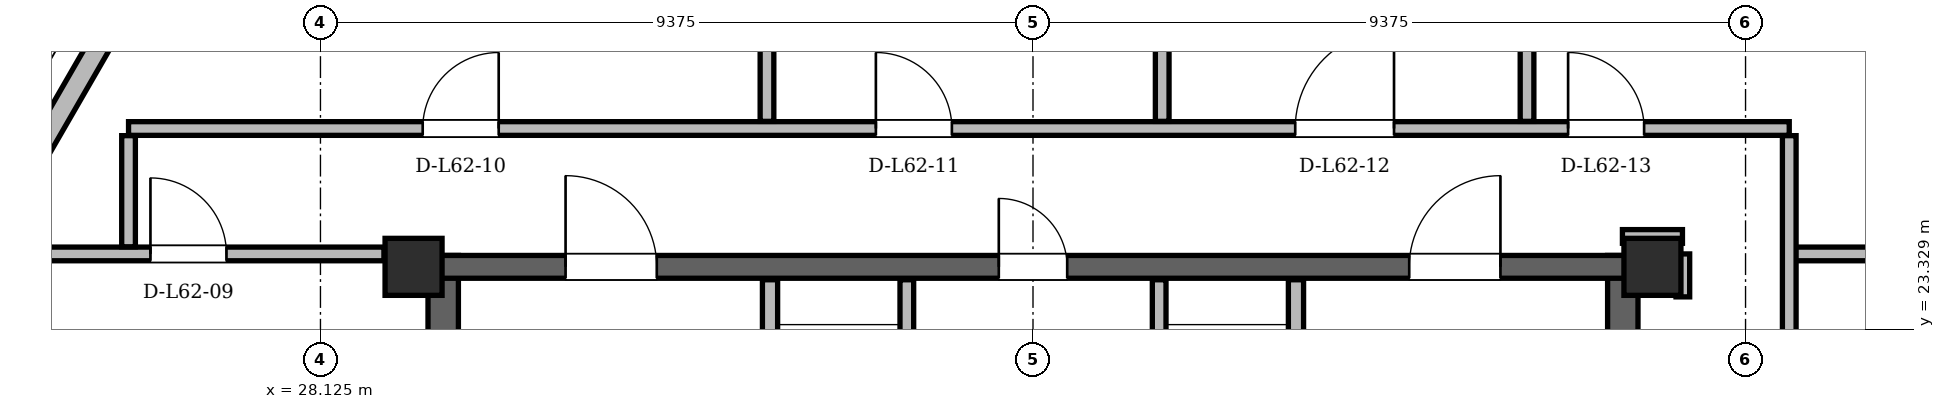
"""IFC4 building model, lengths in metres.
Left out: names, types, materials, properties, quantities, classifications, styles, units other than length and angle.
Written with IfcOpenShell. Run it as: python <this file> out.ifc"""

import sys

from ifc_helpers import new_model, si_unit, direction, frame, frame_2d, origin, origin_2d, place, context, subcontext, project, spatial, rectangle, hollow_rectangle, extrude, element, fill, save


model = new_model("IFC4")
c1 = context("Model", 3, precision=1e-05, world=origin(), true_north=direction((0.0, 1.0)))
c2 = subcontext(c1, "Body", "Model", "MODEL_VIEW")
j1 = project(units=[si_unit("LENGTHUNIT", "METRE"), si_unit("PLANEANGLEUNIT", "RADIAN")], contexts=[c1])
p1 = place(None, origin())
s1 = spatial("IfcSite", under=j1, at=p1, CompositionType="ELEMENT")
p2 = place(p1, origin())
s2 = spatial("IfcBuilding", under=s1, at=p2, CompositionType="ELEMENT")
p3 = place(p2, frame((0.0, 0.0, 234.3)))
s3 = spatial("IfcBuildingStorey", under=s2, at=p3, CompositionType="ELEMENT", Elevation=234.3)
for number, where, z_axis, x_axis in (
    (1, (45.65, 24.15, 0.0), (0.0, 0.0, 1.0), (1.0, 0.0, 0.0)),
    (2, (29.35, 24.15, 0.0), (0.0, 0.0, 1.0), (1.0, 0.0, 0.0)),
):
    element("IfcColumn", number, at=place(p3, frame(where, z_axis=z_axis, x_axis=x_axis)), inside=s3, PredefinedType="COLUMN", context=c2, shape_type="SweptSolid", body=[
        extrude(hollow_rectangle(XDim=0.75, YDim=0.75, WallThickness=0.06, at=origin_2d()), origin(), (0.0, 0.0, 1.0), 3.6),
    ])
for number, where, z_axis, x_axis in (
    (3, (29.74, 11.0, 0.0), (0.0, 0.0, 1.0), (0.0, 1.0, 0.0)),
    (4, (45.26, 11.0, 0.0), (0.0, 0.0, 1.0), (0.0, 1.0, 0.0)),
):
    element("IfcWall", number, at=place(p3, frame(where, z_axis=z_axis, x_axis=x_axis)), inside=s3, PredefinedType="SHEAR", context=c2, shape_type="SweptSolid", body=[
        extrude(rectangle(XDim=13.3, YDim=0.4, at=frame_2d((6.65, 0.0))), origin(), (0.0, 0.0, 1.0), 3.38),
    ])
p4 = place(p3, frame((29.65, 24.15, 0.0), z_axis=(0.0, 0.0, 1.0), x_axis=(1.0, 0.0, 0.0)))
e5 = element("IfcWall", 5, at=p4, inside=s3, PredefinedType="SHEAR", context=c2, shape_type="SweptSolid", body=[
    extrude(rectangle(XDim=15.7, YDim=0.3, at=frame_2d((7.85, 0.0))), origin(), (0.0, 0.0, 1.0), 3.38),
])
p5 = place(p4, frame((1.7, 0.0, 0.0)))
e6 = element("IfcOpeningElement", 6, at=p5, cuts=e5, PredefinedType="OPENING", context=c2, shape_type="SweptSolid", body=[
    extrude(rectangle(XDim=1.2, YDim=2.2, at=frame_2d((0.6, 1.1))), frame((0.0, 0.15, 0.0), z_axis=(0.0, -1.0, 0.0), x_axis=(1.0, 0.0, 0.0)), (0.0, 0.0, 1.0), 0.3),
])
p6 = place(p4, frame((12.8, 0.0, 0.0)))
e7 = element("IfcOpeningElement", 7, at=p6, cuts=e5, PredefinedType="OPENING", context=c2, shape_type="SweptSolid", body=[
    extrude(rectangle(XDim=1.2, YDim=2.2, at=frame_2d((0.6, 1.1))), frame((0.0, 0.15, 0.0), z_axis=(0.0, -1.0, 0.0), x_axis=(1.0, 0.0, 0.0)), (0.0, 0.0, 1.0), 0.3),
])
p7 = place(p4, frame((7.4, 0.0, 0.0)))
e8 = element("IfcOpeningElement", 8, at=p7, cuts=e5, PredefinedType="OPENING", context=c2, shape_type="SweptSolid", body=[
    extrude(rectangle(XDim=0.9, YDim=2.05, at=frame_2d((0.45, 1.025))), frame((0.0, 0.15, 0.0), z_axis=(0.0, -1.0, 0.0), x_axis=(1.0, 0.0, 0.0)), (0.0, 0.0, 1.0), 0.3),
])
p8 = place(p3, frame((58.942, 11.205, 0.0), z_axis=(0.0, 0.0, 1.0), x_axis=(-0.500000614513, 0.866025048995, 0.0)))
e9 = element("IfcWall", 9, at=p8, inside=s3, PredefinedType="SOLIDWALL", context=c2, shape_type="SweptSolid", body=[
    extrude(rectangle(XDim=36.848, YDim=0.29, at=frame_2d((18.424, 0.0))), origin(), (0.0, 0.0, 1.0), 2.677),
])
p9 = place(p8, frame((7.615, 0.0, 0.0)))
e10 = element("IfcOpeningElement", 10, at=p9, cuts=e9, PredefinedType="OPENING", context=c2, shape_type="SweptSolid", body=[
    extrude(rectangle(XDim=1.5, YDim=2.2, at=frame_2d((0.75, 1.1))), frame((0.0, 0.145, 0.0), z_axis=(0.0, -1.0, 0.0), x_axis=(1.0, 0.0, 0.0)), (0.0, 0.0, 1.0), 0.29),
])
p10 = place(p8, frame((28.658, 0.0, 0.0)))
e11 = element("IfcOpeningElement", 11, at=p10, cuts=e9, PredefinedType="OPENING", context=c2, shape_type="SweptSolid", body=[
    extrude(rectangle(XDim=1.3, YDim=2.2, at=frame_2d((0.65, 1.1))), frame((0.0, 0.145, 0.0), z_axis=(0.0, -1.0, 0.0), x_axis=(1.0, 0.0, 0.0)), (0.0, 0.0, 1.0), 0.29),
])
p11 = place(p8, frame((3.643, 0.0, 0.85)))
e12 = element("IfcOpeningElement", 12, at=p11, cuts=e9, PredefinedType="OPENING", context=c2, shape_type="SweptSolid", body=[
    extrude(rectangle(XDim=1.2, YDim=1.48, at=frame_2d((0.6, 0.74))), frame((0.0, 0.145, 0.0), z_axis=(0.0, -1.0, 0.0), x_axis=(1.0, 0.0, 0.0)), (0.0, 0.0, 1.0), 0.29),
])
p12 = place(p8, frame((1.09, 0.0, 0.85)))
e13 = element("IfcOpeningElement", 13, at=p12, cuts=e9, PredefinedType="OPENING", context=c2, shape_type="SweptSolid", body=[
    extrude(rectangle(XDim=1.6, YDim=1.7, at=frame_2d((0.8, 0.85))), frame((0.0, 0.145, 0.0), z_axis=(0.0, -1.0, 0.0), x_axis=(1.0, 0.0, 0.0)), (0.0, 0.0, 1.0), 0.29),
])
p13 = place(p8, frame((34.714, 0.0, 0.85)))
e14 = element("IfcOpeningElement", 14, at=p13, cuts=e9, PredefinedType="OPENING", context=c2, shape_type="SweptSolid", body=[
    extrude(rectangle(XDim=1.2, YDim=1.48, at=frame_2d((0.6, 0.74))), frame((0.0, 0.145, 0.0), z_axis=(0.0, -1.0, 0.0), x_axis=(1.0, 0.0, 0.0)), (0.0, 0.0, 1.0), 0.29),
])
p14 = place(p8, frame((31.648, 0.0, 0.85)))
e15 = element("IfcOpeningElement", 15, at=p14, cuts=e9, PredefinedType="OPENING", context=c2, shape_type="SweptSolid", body=[
    extrude(rectangle(XDim=1.2, YDim=1.48, at=frame_2d((0.6, 0.74))), frame((0.0, 0.145, 0.0), z_axis=(0.0, -1.0, 0.0), x_axis=(1.0, 0.0, 0.0)), (0.0, 0.0, 1.0), 0.29),
])
p15 = place(p8, frame((16.738, 0.0, 0.85)))
e16 = element("IfcOpeningElement", 16, at=p15, cuts=e9, PredefinedType="OPENING", context=c2, shape_type="SweptSolid", body=[
    extrude(rectangle(XDim=2.2, YDim=1.717, at=frame_2d((1.1, 0.858))), frame((0.0, 0.145, 0.0), z_axis=(0.0, -1.0, 0.0), x_axis=(1.0, 0.0, 0.0)), (0.0, 0.0, 1.0), 0.29),
])
p16 = place(p8, frame((22.794, 0.0, 0.85)))
e17 = element("IfcOpeningElement", 17, at=p16, cuts=e9, PredefinedType="OPENING", context=c2, shape_type="SweptSolid", body=[
    extrude(rectangle(XDim=1.6, YDim=1.7, at=frame_2d((0.8, 0.85))), frame((0.0, 0.145, 0.0), z_axis=(0.0, -1.0, 0.0), x_axis=(1.0, 0.0, 0.0)), (0.0, 0.0, 1.0), 0.29),
])
p17 = place(p8, frame((12.349, 0.0, 0.85)))
e18 = element("IfcOpeningElement", 18, at=p17, cuts=e9, PredefinedType="OPENING", context=c2, shape_type="SweptSolid", body=[
    extrude(rectangle(XDim=1.2, YDim=1.48, at=frame_2d((0.6, 0.74))), frame((0.0, 0.145, 0.0), z_axis=(0.0, -1.0, 0.0), x_axis=(1.0, 0.0, 0.0)), (0.0, 0.0, 1.0), 0.29),
])
p18 = place(p3, frame((34.482, 43.116, 0.0), z_axis=(0.0, 0.0, 1.0), x_axis=(-0.500000614513, -0.866025048995, 0.0)))
e19 = element("IfcWall", 19, at=p18, inside=s3, PredefinedType="SOLIDWALL", context=c2, shape_type="SweptSolid", body=[
    extrude(rectangle(XDim=36.848, YDim=0.29, at=frame_2d((18.424, 0.0))), origin(), (0.0, 0.0, 1.0), 2.677),
])
p19 = place(p18, frame((8.034, 0.0, 0.0)))
e20 = element("IfcOpeningElement", 20, at=p19, cuts=e19, PredefinedType="OPENING", context=c2, shape_type="SweptSolid", body=[
    extrude(rectangle(XDim=1.5, YDim=2.2, at=frame_2d((0.75, 1.1))), frame((0.0, 0.145, 0.0), z_axis=(0.0, -1.0, 0.0), x_axis=(1.0, 0.0, 0.0)), (0.0, 0.0, 1.0), 0.29),
])
p20 = place(p18, frame((28.559, 0.0, 0.0)))
e21 = element("IfcOpeningElement", 21, at=p20, cuts=e19, PredefinedType="OPENING", context=c2, shape_type="SweptSolid", body=[
    extrude(rectangle(XDim=1.5, YDim=2.2, at=frame_2d((0.75, 1.1))), frame((0.0, 0.145, 0.0), z_axis=(0.0, -1.0, 0.0), x_axis=(1.0, 0.0, 0.0)), (0.0, 0.0, 1.0), 0.29),
])
p21 = place(p18, frame((21.863, 0.0, 0.85)))
e22 = element("IfcOpeningElement", 22, at=p21, cuts=e19, PredefinedType="OPENING", context=c2, shape_type="SweptSolid", body=[
    extrude(rectangle(XDim=2.4, YDim=1.717, at=frame_2d((1.2, 0.858))), frame((0.0, 0.145, 0.0), z_axis=(0.0, -1.0, 0.0), x_axis=(1.0, 0.0, 0.0)), (0.0, 0.0, 1.0), 0.29),
])
p22 = place(p18, frame((34.677, 0.0, 0.85)))
e23 = element("IfcOpeningElement", 23, at=p22, cuts=e19, PredefinedType="OPENING", context=c2, shape_type="SweptSolid", body=[
    extrude(rectangle(XDim=1.2, YDim=1.48, at=frame_2d((0.6, 0.74))), frame((0.0, 0.145, 0.0), z_axis=(0.0, -1.0, 0.0), x_axis=(1.0, 0.0, 0.0)), (0.0, 0.0, 1.0), 0.29),
])
p23 = place(p18, frame((32.477, 0.0, 0.85)))
e24 = element("IfcOpeningElement", 24, at=p23, cuts=e19, PredefinedType="OPENING", context=c2, shape_type="SweptSolid", body=[
    extrude(rectangle(XDim=1.4, YDim=1.6, at=frame_2d((0.7, 0.8))), frame((0.0, 0.145, 0.0), z_axis=(0.0, -1.0, 0.0), x_axis=(1.0, 0.0, 0.0)), (0.0, 0.0, 1.0), 0.29),
])
p24 = place(p18, frame((12.14, 0.0, 0.85)))
e25 = element("IfcOpeningElement", 25, at=p24, cuts=e19, PredefinedType="OPENING", context=c2, shape_type="SweptSolid", body=[
    extrude(rectangle(XDim=1.2, YDim=1.48, at=frame_2d((0.6, 0.74))), frame((0.0, 0.145, 0.0), z_axis=(0.0, -1.0, 0.0), x_axis=(1.0, 0.0, 0.0)), (0.0, 0.0, 1.0), 0.29),
])
p25 = place(p18, frame((16.54, 0.0, 0.85)))
e26 = element("IfcOpeningElement", 26, at=p25, cuts=e19, PredefinedType="OPENING", context=c2, shape_type="SweptSolid", body=[
    extrude(rectangle(XDim=2.0, YDim=1.717, at=frame_2d((1.0, 0.858))), frame((0.0, 0.145, 0.0), z_axis=(0.0, -1.0, 0.0), x_axis=(1.0, 0.0, 0.0)), (0.0, 0.0, 1.0), 0.29),
])
p26 = place(p18, frame((2.059, 0.0, 0.85)))
e27 = element("IfcOpeningElement", 27, at=p26, cuts=e19, PredefinedType="OPENING", context=c2, shape_type="SweptSolid", body=[
    extrude(rectangle(XDim=1.2, YDim=1.48, at=frame_2d((0.6, 0.74))), frame((0.0, 0.145, 0.0), z_axis=(0.0, -1.0, 0.0), x_axis=(1.0, 0.0, 0.0)), (0.0, 0.0, 1.0), 0.29),
])
p27 = place(p3, frame((34.04, 19.48, 0.0), z_axis=(0.0, 0.0, 1.0), x_axis=(0.0, 1.0, 0.0)))
e28 = element("IfcWall", 28, at=p27, inside=s3, PredefinedType="PARTITIONING", context=c2, shape_type="SweptSolid", body=[
    extrude(rectangle(XDim=4.5, YDim=0.2, at=frame_2d((2.25, 0.0))), origin(), (0.0, 0.0, 1.0), 3.38),
])
p28 = place(p27, frame((2.12, 0.0, 0.0)))
e29 = element("IfcOpeningElement", 29, at=p28, cuts=e28, PredefinedType="OPENING", context=c2, shape_type="SweptSolid", body=[
    extrude(rectangle(XDim=1.1, YDim=2.2, at=frame_2d((0.55, 1.1))), frame((0.0, 0.1, 0.0), z_axis=(0.0, -1.0, 0.0), x_axis=(1.0, 0.0, 0.0)), (0.0, 0.0, 1.0), 0.2),
])
p29 = place(p3, frame((35.84, 20.96, 0.0), z_axis=(0.0, 0.0, 1.0), x_axis=(0.0, 1.0, 0.0)))
e30 = element("IfcWall", 30, at=p29, inside=s3, PredefinedType="PARTITIONING", context=c2, shape_type="SweptSolid", body=[
    extrude(rectangle(XDim=3.02, YDim=0.18, at=frame_2d((1.51, 0.0))), origin(), (0.0, 0.0, 1.0), 3.38),
])
p30 = place(p3, frame((40.96, 19.48, 0.0), z_axis=(0.0, 0.0, 1.0), x_axis=(0.0, 1.0, 0.0)))
e31 = element("IfcWall", 31, at=p30, inside=s3, PredefinedType="PARTITIONING", context=c2, shape_type="SweptSolid", body=[
    extrude(rectangle(XDim=4.5, YDim=0.2, at=frame_2d((2.25, 0.0))), origin(), (0.0, 0.0, 1.0), 3.38),
])
p31 = place(p30, frame((2.12, 0.0, 0.0)))
e32 = element("IfcOpeningElement", 32, at=p31, cuts=e31, PredefinedType="OPENING", context=c2, shape_type="SweptSolid", body=[
    extrude(rectangle(XDim=1.1, YDim=2.2, at=frame_2d((0.55, 1.1))), frame((0.0, 0.1, 0.0), z_axis=(0.0, -1.0, 0.0), x_axis=(1.0, 0.0, 0.0)), (0.0, 0.0, 1.0), 0.2),
])
p32 = place(p3, frame((39.16, 20.96, 0.0), z_axis=(0.0, 0.0, 1.0), x_axis=(0.0, 1.0, 0.0)))
e33 = element("IfcWall", 33, at=p32, inside=s3, PredefinedType="PARTITIONING", context=c2, shape_type="SweptSolid", body=[
    extrude(rectangle(XDim=3.02, YDim=0.18, at=frame_2d((1.51, 0.0))), origin(), (0.0, 0.0, 1.0), 3.38),
])
p33 = place(p3, frame((23.802, 24.32, 0.0), z_axis=(0.0, 0.0, 1.0), x_axis=(1.0, 0.0, 0.0)))
e34 = element("IfcWall", 34, at=p33, inside=s3, PredefinedType="PARTITIONING", context=c2, shape_type="SweptSolid", body=[
    extrude(rectangle(XDim=5.158, YDim=0.18, at=frame_2d((2.579, 0.0))), origin(), (0.0, 0.0, 1.0), 3.38),
])
p34 = place(p33, frame((2.086, 0.0, 0.0)))
e35 = element("IfcOpeningElement", 35, at=p34, cuts=e34, PredefinedType="OPENING", context=c2, shape_type="SweptSolid", body=[
    extrude(rectangle(XDim=1.0, YDim=2.18, at=frame_2d((0.5, 1.09))), frame((0.0, 0.09, 0.0), z_axis=(0.0, -1.0, 0.0), x_axis=(1.0, 0.0, 0.0)), (0.0, 0.0, 1.0), 0.18),
])
p35 = place(p3, frame((47.45, 24.32, 0.0), z_axis=(0.0, 0.0, 1.0), x_axis=(1.0, 0.0, 0.0)))
e36 = element("IfcWall", 36, at=p35, inside=s3, PredefinedType="PARTITIONING", context=c2, shape_type="SweptSolid", body=[
    extrude(rectangle(XDim=3.748, YDim=0.18, at=frame_2d((1.874, 0.0))), origin(), (0.0, 0.0, 1.0), 3.38),
])
p36 = place(p3, frame((45.255, 24.55, 0.0), z_axis=(0.0, 0.0, 1.0), x_axis=(1.0, 0.0, 0.0)))
e37 = element("IfcWall", 37, at=p36, inside=s3, PredefinedType="PARTITIONING", context=c2, shape_type="SweptSolid", body=[
    extrude(rectangle(XDim=0.79, YDim=0.18, at=frame_2d((0.395, 0.0))), origin(), (0.0, 0.0, 1.0), 2.913),
])
p37 = place(p3, frame((25.6, 25.97, 0.0), z_axis=(0.0, 0.0, 1.0), x_axis=(1.0, 0.0, 0.0)))
e38 = element("IfcWall", 38, at=p37, inside=s3, PredefinedType="PARTITIONING", context=c2, shape_type="SweptSolid", body=[
    extrude(rectangle(XDim=21.85, YDim=0.18, at=frame_2d((10.925, 0.0))), origin(), (0.0, 0.0, 1.0), 2.913),
])
p38 = place(p37, frame((3.87, 0.0, 0.0)))
e39 = element("IfcOpeningElement", 39, at=p38, cuts=e38, PredefinedType="OPENING", context=c2, shape_type="SweptSolid", body=[
    extrude(rectangle(XDim=1.0, YDim=2.18, at=frame_2d((0.5, 1.09))), frame((0.0, 0.09, 0.0), z_axis=(0.0, -1.0, 0.0), x_axis=(1.0, 0.0, 0.0)), (0.0, 0.0, 1.0), 0.18),
])
p39 = place(p37, frame((9.833, 0.0, 0.0)))
e40 = element("IfcOpeningElement", 40, at=p39, cuts=e38, PredefinedType="OPENING", context=c2, shape_type="SweptSolid", body=[
    extrude(rectangle(XDim=1.0, YDim=2.18, at=frame_2d((0.5, 1.09))), frame((0.0, 0.09, 0.0), z_axis=(0.0, -1.0, 0.0), x_axis=(1.0, 0.0, 0.0)), (0.0, 0.0, 1.0), 0.18),
])
p40 = place(p37, frame((15.35, 0.0, 0.0)))
e41 = element("IfcOpeningElement", 41, at=p40, cuts=e38, PredefinedType="OPENING", context=c2, shape_type="SweptSolid", body=[
    extrude(rectangle(XDim=1.3, YDim=2.2, at=frame_2d((0.65, 1.1))), frame((0.0, 0.09, 0.0), z_axis=(0.0, -1.0, 0.0), x_axis=(1.0, 0.0, 0.0)), (0.0, 0.0, 1.0), 0.18),
])
p41 = place(p37, frame((18.94, 0.0, 0.0)))
e42 = element("IfcOpeningElement", 42, at=p41, cuts=e38, PredefinedType="OPENING", context=c2, shape_type="SweptSolid", body=[
    extrude(rectangle(XDim=1.0, YDim=2.18, at=frame_2d((0.5, 1.09))), frame((0.0, 0.09, 0.0), z_axis=(0.0, -1.0, 0.0), x_axis=(1.0, 0.0, 0.0)), (0.0, 0.0, 1.0), 0.18),
])
p42 = place(p3, frame((25.6, 24.414, 0.0), z_axis=(0.0, 0.0, 1.0), x_axis=(0.0, 1.0, 0.0)))
e43 = element("IfcWall", 43, at=p42, inside=s3, PredefinedType="PARTITIONING", context=c2, shape_type="SweptSolid", body=[
    extrude(rectangle(XDim=1.462, YDim=0.18, at=frame_2d((0.731, 0.0))), origin(), (0.0, 0.0, 1.0), 3.38),
])
p43 = place(p3, frame((34.0, 26.064, 0.0), z_axis=(0.0, 0.0, 1.0), x_axis=(0.0, 1.0, 0.0)))
e44 = element("IfcWall", 44, at=p43, inside=s3, PredefinedType="PARTITIONING", context=c2, shape_type="SweptSolid", body=[
    extrude(rectangle(XDim=15.919, YDim=0.18, at=frame_2d((7.959, 0.0))), origin(), (0.0, 0.0, 1.0), 2.913),
])
p44 = place(p3, frame((39.2, 26.064, 0.0), z_axis=(0.0, 0.0, 1.0), x_axis=(0.0, 1.0, 0.0)))
e45 = element("IfcWall", 45, at=p44, inside=s3, PredefinedType="PARTITIONING", context=c2, shape_type="SweptSolid", body=[
    extrude(rectangle(XDim=4.312, YDim=0.18, at=frame_2d((2.156, 0.0))), origin(), (0.0, 0.0, 1.0), 3.38),
])
p45 = place(p3, frame((44.0, 26.064, 0.0), z_axis=(0.0, 0.0, 1.0), x_axis=(0.0, 1.0, 0.0)))
e46 = element("IfcWall", 46, at=p45, inside=s3, PredefinedType="PARTITIONING", context=c2, shape_type="SweptSolid", body=[
    extrude(rectangle(XDim=4.312, YDim=0.18, at=frame_2d((2.156, 0.0))), origin(), (0.0, 0.0, 1.0), 2.913),
])
p46 = place(p3, frame((46.05, 23.755, 0.0), z_axis=(0.0, 0.0, 1.0), x_axis=(0.0, 1.0, 0.0)))
e47 = element("IfcWall", 47, at=p46, inside=s3, PredefinedType="PARTITIONING", context=c2, shape_type="SweptSolid", body=[
    extrude(rectangle(XDim=0.565, YDim=0.18, at=frame_2d((0.283, 0.0))), origin(), (0.0, 0.0, 1.0), 3.38),
])
p47 = place(p3, frame((47.45, 9.394, 0.0), z_axis=(0.0, 0.0, 1.0), x_axis=(0.0, 1.0, 0.0)))
e48 = element("IfcWall", 48, at=p47, inside=s3, PredefinedType="PARTITIONING", context=c2, shape_type="SweptSolid", body=[
    extrude(rectangle(XDim=16.482, YDim=0.18, at=frame_2d((8.241, 0.0))), origin(), (0.0, 0.0, 1.0), 2.913),
])
p48 = place(p47, frame((6.247, 0.0, 0.0)))
e49 = element("IfcOpeningElement", 49, at=p48, cuts=e48, PredefinedType="OPENING", context=c2, shape_type="SweptSolid", body=[
    extrude(rectangle(XDim=1.0, YDim=2.18, at=frame_2d((0.5, 1.09))), frame((0.0, 0.09, 0.0), z_axis=(0.0, -1.0, 0.0), x_axis=(1.0, 0.0, 0.0)), (0.0, 0.0, 1.0), 0.18),
])
p49 = place(p47, frame((10.379, 0.0, 0.0)))
e50 = element("IfcOpeningElement", 50, at=p49, cuts=e48, PredefinedType="OPENING", context=c2, shape_type="SweptSolid", body=[
    extrude(rectangle(XDim=1.0, YDim=2.18, at=frame_2d((0.5, 1.09))), frame((0.0, 0.09, 0.0), z_axis=(0.0, -1.0, 0.0), x_axis=(1.0, 0.0, 0.0)), (0.0, 0.0, 1.0), 0.18),
])
p50 = place(p5, origin())
e51 = element("IfcDoor", 51, at=p50, inside=s3, OperationType="SINGLE_SWING_LEFT", PredefinedType="DOOR", context=c2, shape_type="SweptSolid", body=[
    extrude(rectangle(XDim=1.2, YDim=2.2, at=frame_2d((0.6, 1.1))), frame((0.0, 0.025, 0.0), z_axis=(0.0, -1.0, 0.0), x_axis=(1.0, 0.0, 0.0)), (0.0, 0.0, 1.0), 0.05),
])
fill(e6, e51)
p51 = place(p6, origin())
e52 = element("IfcDoor", 52, at=p51, inside=s3, OperationType="SINGLE_SWING_RIGHT", PredefinedType="DOOR", context=c2, shape_type="SweptSolid", body=[
    extrude(rectangle(XDim=1.2, YDim=2.2, at=frame_2d((0.6, 1.1))), frame((0.0, 0.025, 0.0), z_axis=(0.0, -1.0, 0.0), x_axis=(1.0, 0.0, 0.0)), (0.0, 0.0, 1.0), 0.05),
])
fill(e7, e52)
p52 = place(p7, origin())
e53 = element("IfcDoor", 53, at=p52, inside=s3, OperationType="SINGLE_SWING_LEFT", PredefinedType="DOOR", context=c2, shape_type="SweptSolid", body=[
    extrude(rectangle(XDim=0.9, YDim=2.05, at=frame_2d((0.45, 1.025))), frame((0.0, 0.025, 0.0), z_axis=(0.0, -1.0, 0.0), x_axis=(1.0, 0.0, 0.0)), (0.0, 0.0, 1.0), 0.05),
])
fill(e8, e53)
p53 = place(p34, origin())
e54 = element("IfcDoor", 54, at=p53, inside=s3, OperationType="SINGLE_SWING_LEFT", PredefinedType="DOOR", context=c2, shape_type="SweptSolid", body=[
    extrude(rectangle(XDim=1.0, YDim=2.18, at=frame_2d((0.5, 1.09))), frame((0.0, 0.025, 0.0), z_axis=(0.0, -1.0, 0.0), x_axis=(1.0, 0.0, 0.0)), (0.0, 0.0, 1.0), 0.05),
])
fill(e35, e54)
p54 = place(p38, origin())
e55 = element("IfcDoor", 55, at=p54, inside=s3, OperationType="SINGLE_SWING_RIGHT", PredefinedType="DOOR", context=c2, shape_type="SweptSolid", body=[
    extrude(rectangle(XDim=1.0, YDim=2.18, at=frame_2d((0.5, 1.09))), frame((0.0, 0.025, 0.0), z_axis=(0.0, -1.0, 0.0), x_axis=(1.0, 0.0, 0.0)), (0.0, 0.0, 1.0), 0.05),
])
fill(e39, e55)
p55 = place(p39, origin())
e56 = element("IfcDoor", 56, at=p55, inside=s3, OperationType="SINGLE_SWING_LEFT", PredefinedType="DOOR", context=c2, shape_type="SweptSolid", body=[
    extrude(rectangle(XDim=1.0, YDim=2.18, at=frame_2d((0.5, 1.09))), frame((0.0, 0.025, 0.0), z_axis=(0.0, -1.0, 0.0), x_axis=(1.0, 0.0, 0.0)), (0.0, 0.0, 1.0), 0.05),
])
fill(e40, e56)
p56 = place(p40, origin())
e57 = element("IfcDoor", 57, at=p56, inside=s3, OperationType="SINGLE_SWING_RIGHT", PredefinedType="DOOR", context=c2, shape_type="SweptSolid", body=[
    extrude(rectangle(XDim=1.3, YDim=2.2, at=frame_2d((0.65, 1.1))), frame((0.0, 0.025, 0.0), z_axis=(0.0, -1.0, 0.0), x_axis=(1.0, 0.0, 0.0)), (0.0, 0.0, 1.0), 0.05),
])
fill(e41, e57)
p57 = place(p41, origin())
e58 = element("IfcDoor", 58, at=p57, inside=s3, OperationType="SINGLE_SWING_LEFT", PredefinedType="DOOR", context=c2, shape_type="SweptSolid", body=[
    extrude(rectangle(XDim=1.0, YDim=2.18, at=frame_2d((0.5, 1.09))), frame((0.0, 0.025, 0.0), z_axis=(0.0, -1.0, 0.0), x_axis=(1.0, 0.0, 0.0)), (0.0, 0.0, 1.0), 0.05),
])
fill(e42, e58)
save(model, sys.argv[1])
